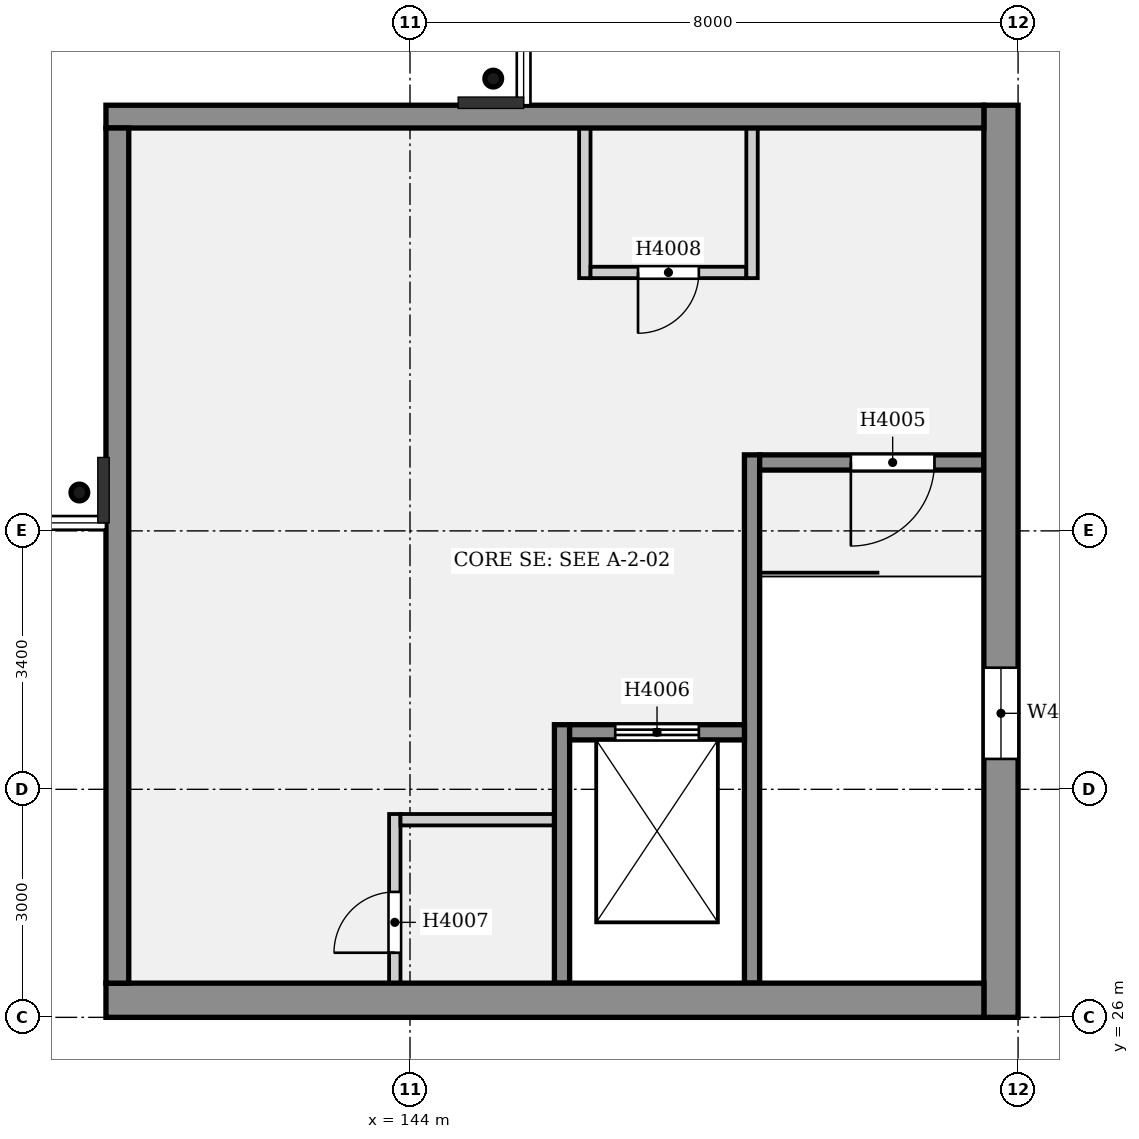
"""IFC4 building model, lengths in metres.
Left out: names, types, materials, properties, quantities, classifications, styles, units other than length and angle.
Written with IfcOpenShell. Run it as: python <this file> out.ifc"""

import sys

from ifc_helpers import new_model, si_unit, direction, frame, frame_2d, origin, origin_2d, place, context, subcontext, project, spatial, rectangle, hollow_circle, extrude, element, fill, save


model = new_model("IFC4")
c1 = context("Model", 3, precision=1e-05, world=origin(), true_north=direction((0.0, 1.0)))
c2 = subcontext(c1, "Body", "Model", "MODEL_VIEW")
j1 = project(units=[si_unit("LENGTHUNIT", "METRE"), si_unit("PLANEANGLEUNIT", "RADIAN")], contexts=[c1])
p1 = place(None, origin())
s1 = spatial("IfcSite", under=j1, at=p1, CompositionType="ELEMENT")
p2 = place(p1, origin())
s2 = spatial("IfcBuilding", under=s1, at=p2, CompositionType="ELEMENT")
p3 = place(p2, frame((0.0, 0.0, 18.2)))
s3 = spatial("IfcBuildingStorey", under=s2, at=p3, CompositionType="ELEMENT", Elevation=18.2)
p4 = place(p3, frame((151.775, 26.0, 0.0), z_axis=(0.0, 0.0, 1.0), x_axis=(0.0, 1.0, 0.0)))
e1 = element("IfcWall", 1, at=p4, inside=s3, PredefinedType="ELEMENTEDWALL", context=c2, shape_type="SweptSolid", body=[
    extrude(rectangle(XDim=12.0, YDim=0.45, at=frame_2d((6.0, 0.0))), origin(), (0.0, 0.0, 1.0), 4.4),
])
p5 = place(p4, frame((3.4, 0.0, 0.6)))
e2 = element("IfcOpeningElement", 2, at=p5, cuts=e1, PredefinedType="OPENING", context=c2, shape_type="SweptSolid", body=[
    extrude(rectangle(XDim=1.2, YDim=3.0, at=frame_2d((0.6, 1.5))), frame((0.0, 0.235, 0.0), z_axis=(0.0, -1.0, 0.0), x_axis=(1.0, 0.0, 0.0)), (0.0, 0.0, 1.0), 0.47),
])
p6 = place(p3, frame((151.55, 26.225, 0.0), z_axis=(0.0, 0.0, 1.0), x_axis=(-1.0, 0.0, 0.0)))
e3 = element("IfcWall", 3, at=p6, inside=s3, PredefinedType="ELEMENTEDWALL", context=c2, shape_type="SweptSolid", body=[
    extrude(rectangle(XDim=11.55, YDim=0.45, at=frame_2d((5.775, 0.0))), origin(), (0.0, 0.0, 1.0), 4.4),
])
p7 = place(p3, frame((140.15, 26.45, 0.0), z_axis=(0.0, 0.0, 1.0), x_axis=(0.0, 1.0, 0.0)))
e4 = element("IfcWall", 4, at=p7, inside=s3, PredefinedType="SOLIDWALL", context=c2, shape_type="SweptSolid", body=[
    extrude(rectangle(XDim=11.25, YDim=0.3, at=frame_2d((5.625, 0.0))), origin(), (0.0, 0.0, 1.0), 4.4),
])
p8 = place(p3, frame((151.55, 37.85, 0.0), z_axis=(0.0, 0.0, 1.0), x_axis=(-1.0, 0.0, 0.0)))
e5 = element("IfcWall", 5, at=p8, inside=s3, PredefinedType="SOLIDWALL", context=c2, shape_type="SweptSolid", body=[
    extrude(rectangle(XDim=11.55, YDim=0.3, at=frame_2d((5.775, 0.0))), origin(), (0.0, 0.0, 1.0), 4.4),
])
for number, where, z_axis, x_axis in (
    (6, (139.65, 32.905, 0.0), (0.0, 0.199, 0.98), (-1.0, 0.0, 0.0)),
    (7, (145.095, 38.35, 0.0), (-0.199, 0.0, 0.98), (0.0, -1.0, 0.0)),
):
    element("IfcColumn", number, at=place(p3, frame(where, z_axis=z_axis, x_axis=x_axis)), inside=s3, PredefinedType="COLUMN", context=c2, shape_type="SweptSolid", body=[
        extrude(hollow_circle(Radius=0.11, WallThickness=0.013, at=origin_2d()), origin(), (0.0, 0.0, 1.0), 3.776),
    ])
p9 = place(p3, frame((148.5, 26.45, 0.0), z_axis=(0.0, 0.0, 1.0), x_axis=(0.0, 1.0, 0.0)))
e8 = element("IfcWall", 8, at=p9, inside=s3, PredefinedType="SOLIDWALL", context=c2, shape_type="SweptSolid", body=[
    extrude(rectangle(XDim=6.95, YDim=0.2, at=frame_2d((3.475, 0.0))), origin(), (0.0, 0.0, 1.0), 4.4),
])
p10 = place(p3, frame((151.55, 33.3, 0.0), z_axis=(0.0, 0.0, 1.0), x_axis=(-1.0, 0.0, 0.0)))
e9 = element("IfcWall", 9, at=p10, inside=s3, PredefinedType="SOLIDWALL", context=c2, shape_type="SweptSolid", body=[
    extrude(rectangle(XDim=2.95, YDim=0.2, at=frame_2d((1.475, 0.0))), origin(), (0.0, 0.0, 1.0), 4.4),
])
p11 = place(p10, frame((0.65, 0.0, 0.0)))
e10 = element("IfcOpeningElement", 10, at=p11, cuts=e9, PredefinedType="OPENING", context=c2, shape_type="SweptSolid", body=[
    extrude(rectangle(XDim=1.1, YDim=2.1, at=frame_2d((0.55, 1.05))), frame((0.0, 0.11, 0.0), z_axis=(0.0, -1.0, 0.0), x_axis=(1.0, 0.0, 0.0)), (0.0, 0.0, 1.0), 0.22),
])
p12 = place(p3, frame((146.0, 26.45, 0.0), z_axis=(0.0, 0.0, 1.0), x_axis=(0.0, 1.0, 0.0)))
e11 = element("IfcWall", 11, at=p12, inside=s3, PredefinedType="SOLIDWALL", context=c2, shape_type="SweptSolid", body=[
    extrude(rectangle(XDim=3.4, YDim=0.2, at=frame_2d((1.7, 0.0))), origin(), (0.0, 0.0, 1.0), 4.4),
])
p13 = place(p3, frame((148.4, 29.75, 0.0), z_axis=(0.0, 0.0, 1.0), x_axis=(-1.0, 0.0, 0.0)))
e12 = element("IfcWall", 12, at=p13, inside=s3, PredefinedType="SOLIDWALL", context=c2, shape_type="SweptSolid", body=[
    extrude(rectangle(XDim=2.3, YDim=0.2, at=frame_2d((1.15, 0.0))), origin(), (0.0, 0.0, 1.0), 4.4),
])
p14 = place(p13, frame((0.6, 0.0, 0.0)))
e13 = element("IfcOpeningElement", 13, at=p14, cuts=e12, PredefinedType="OPENING", context=c2, shape_type="SweptSolid", body=[
    extrude(rectangle(XDim=1.1, YDim=2.1, at=frame_2d((0.55, 1.05))), frame((0.0, 0.11, 0.0), z_axis=(0.0, -1.0, 0.0), x_axis=(1.0, 0.0, 0.0)), (0.0, 0.0, 1.0), 0.22),
])
p15 = place(p3, frame((145.9, 28.6, 0.0), z_axis=(0.0, 0.0, 1.0), x_axis=(-1.0, 0.0, 0.0)))
e14 = element("IfcWall", 14, at=p15, inside=s3, PredefinedType="PARTITIONING", context=c2, shape_type="SweptSolid", body=[
    extrude(rectangle(XDim=2.025, YDim=0.15, at=frame_2d((1.012, 0.0))), origin(), (0.0, 0.0, 1.0), 4.4),
])
p16 = place(p3, frame((143.8, 26.45, 0.0), z_axis=(0.0, 0.0, 1.0), x_axis=(0.0, 1.0, 0.0)))
e15 = element("IfcWall", 15, at=p16, inside=s3, PredefinedType="PARTITIONING", context=c2, shape_type="SweptSolid", body=[
    extrude(rectangle(XDim=2.225, YDim=0.15, at=frame_2d((1.113, 0.0))), origin(), (0.0, 0.0, 1.0), 4.4),
])
p17 = place(p16, frame((0.4, 0.0, 0.0)))
e16 = element("IfcOpeningElement", 16, at=p17, cuts=e15, PredefinedType="OPENING", context=c2, shape_type="SweptSolid", body=[
    extrude(rectangle(XDim=0.8, YDim=2.1, at=frame_2d((0.4, 1.05))), frame((0.0, 0.085, 0.0), z_axis=(0.0, -1.0, 0.0), x_axis=(1.0, 0.0, 0.0)), (0.0, 0.0, 1.0), 0.17),
])
p18 = place(p3, frame((148.425, 35.8, 0.0), z_axis=(0.0, 0.0, 1.0), x_axis=(-1.0, 0.0, 0.0)))
e17 = element("IfcWall", 17, at=p18, inside=s3, PredefinedType="PARTITIONING", context=c2, shape_type="SweptSolid", body=[
    extrude(rectangle(XDim=2.05, YDim=0.15, at=frame_2d((1.025, 0.0))), origin(), (0.0, 0.0, 1.0), 4.4),
])
p19 = place(p18, frame((0.625, 0.0, 0.0)))
e18 = element("IfcOpeningElement", 18, at=p19, cuts=e17, PredefinedType="OPENING", context=c2, shape_type="SweptSolid", body=[
    extrude(rectangle(XDim=0.8, YDim=2.1, at=frame_2d((0.4, 1.05))), frame((0.0, 0.085, 0.0), z_axis=(0.0, -1.0, 0.0), x_axis=(1.0, 0.0, 0.0)), (0.0, 0.0, 1.0), 0.17),
])
for number, where, z_axis, x_axis in (
    (19, (148.5, 35.725, 0.0), (0.0, 0.0, 1.0), (0.0, 1.0, 0.0)),
    (20, (146.3, 35.725, 0.0), (0.0, 0.0, 1.0), (0.0, 1.0, 0.0)),
):
    element("IfcWall", number, at=place(p3, frame(where, z_axis=z_axis, x_axis=x_axis)), inside=s3, PredefinedType="PARTITIONING", context=c2, shape_type="SweptSolid", body=[
        extrude(rectangle(XDim=1.975, YDim=0.15, at=frame_2d((0.987, 0.0))), origin(), (0.0, 0.0, 1.0), 4.4),
    ])
p20 = place(p11, origin())
e21 = element("IfcDoor", 21, at=p20, inside=s3, OperationType="SINGLE_SWING_RIGHT", PredefinedType="DOOR", context=c2, shape_type="SweptSolid", body=[
    extrude(rectangle(XDim=1.1, YDim=2.1, at=frame_2d((0.55, 1.05))), frame((0.0, 0.025, 0.0), z_axis=(0.0, -1.0, 0.0), x_axis=(1.0, 0.0, 0.0)), (0.0, 0.0, 1.0), 0.05),
])
fill(e10, e21)
p21 = place(p14, origin())
e22 = element("IfcDoor", 22, at=p21, inside=s3, OperationType="DOUBLE_DOOR_SLIDING", PredefinedType="DOOR", context=c2, shape_type="SweptSolid", body=[
    extrude(rectangle(XDim=1.1, YDim=2.1, at=frame_2d((0.55, 1.05))), frame((0.0, 0.025, 0.0), z_axis=(0.0, -1.0, 0.0), x_axis=(1.0, 0.0, 0.0)), (0.0, 0.0, 1.0), 0.05),
])
fill(e13, e22)
p22 = place(p17, origin())
e23 = element("IfcDoor", 23, at=p22, inside=s3, OperationType="SINGLE_SWING_LEFT", PredefinedType="DOOR", context=c2, shape_type="SweptSolid", body=[
    extrude(rectangle(XDim=0.8, YDim=2.1, at=frame_2d((0.4, 1.05))), frame((0.0, 0.025, 0.0), z_axis=(0.0, -1.0, 0.0), x_axis=(1.0, 0.0, 0.0)), (0.0, 0.0, 1.0), 0.05),
])
fill(e16, e23)
p23 = place(p19, origin())
e24 = element("IfcDoor", 24, at=p23, inside=s3, OperationType="SINGLE_SWING_RIGHT", PredefinedType="DOOR", context=c2, shape_type="SweptSolid", body=[
    extrude(rectangle(XDim=0.8, YDim=2.1, at=frame_2d((0.4, 1.05))), frame((0.0, 0.025, 0.0), z_axis=(0.0, -1.0, 0.0), x_axis=(1.0, 0.0, 0.0)), (0.0, 0.0, 1.0), 0.05),
])
fill(e18, e24)
p24 = place(p5, origin())
e25 = element("IfcWindow", 25, at=p24, inside=s3, PartitioningType="SINGLE_PANEL", PredefinedType="WINDOW", context=c2, shape_type="SweptSolid", body=[
    extrude(rectangle(XDim=1.2, YDim=3.0, at=frame_2d((0.6, 1.5))), frame((0.0, 0.03, 0.0), z_axis=(0.0, -1.0, 0.0), x_axis=(1.0, 0.0, 0.0)), (0.0, 0.0, 1.0), 0.06),
])
fill(e2, e25)
save(model, sys.argv[1])
